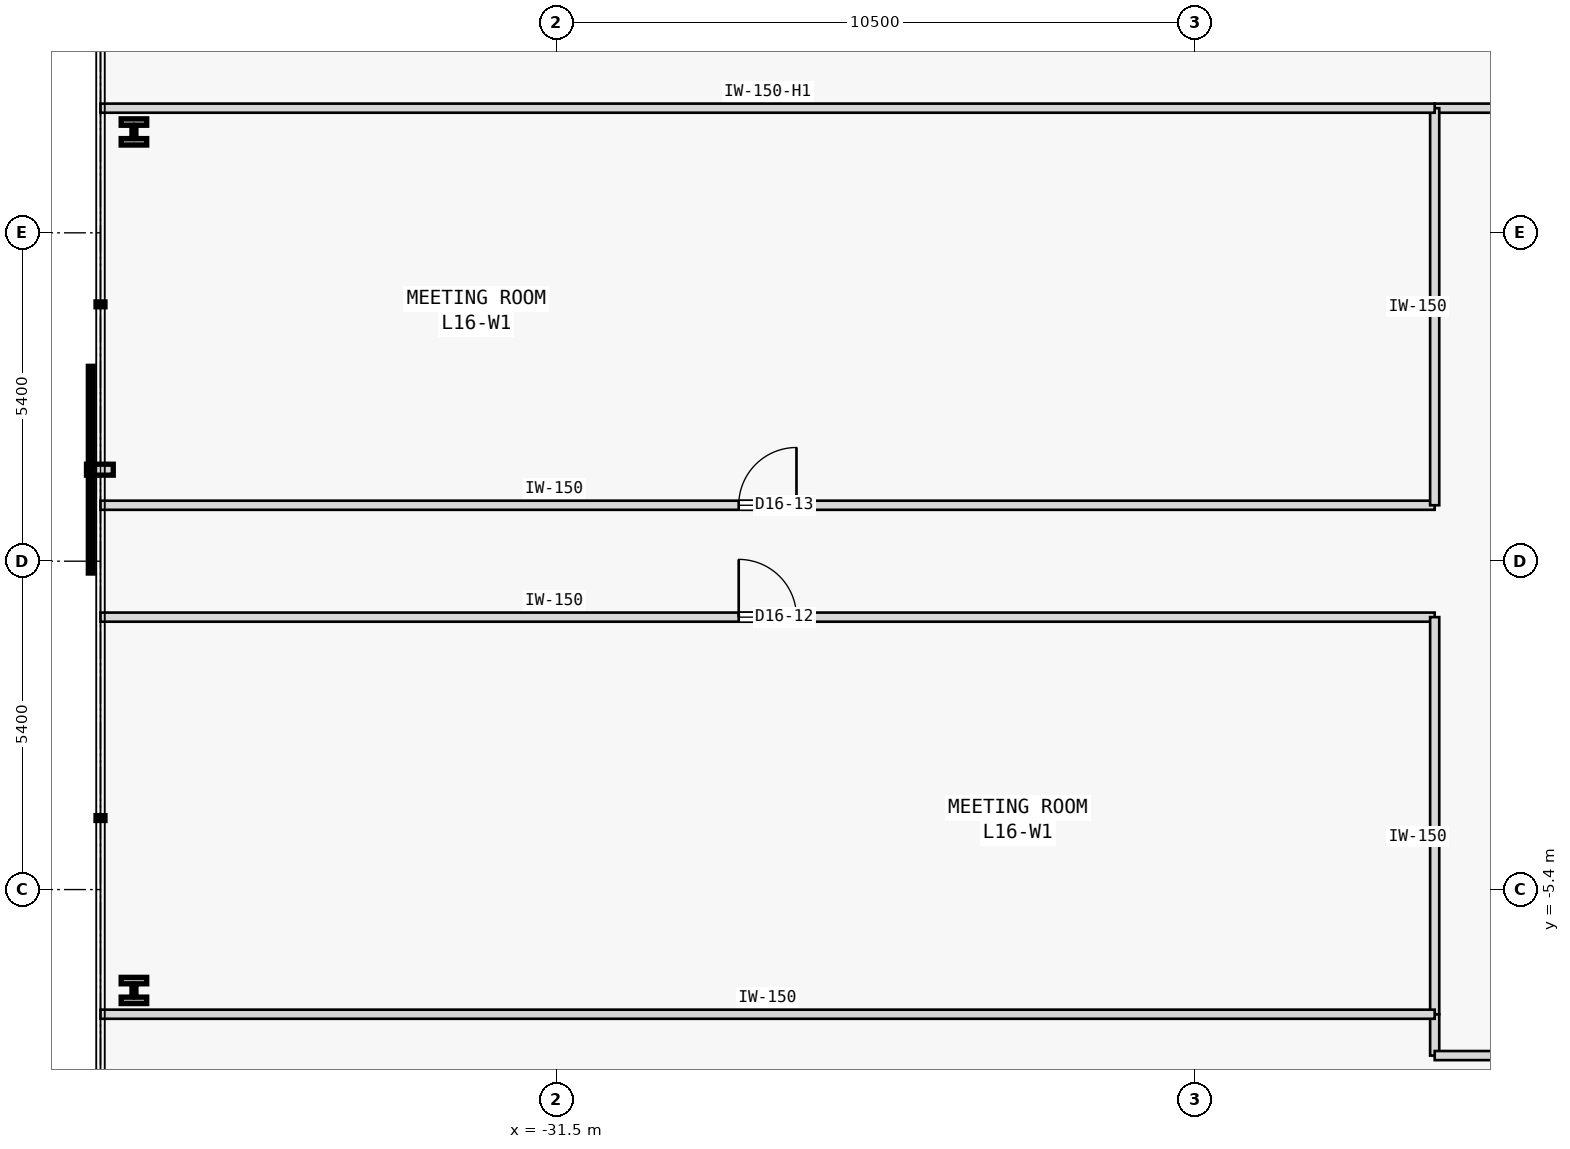
"""IFC4 building model, lengths in metres.
Left out: names, types, materials, properties, quantities, classifications, styles, units other than length and angle.
Written with IfcOpenShell. Run it as: python <this file> out.ifc"""

import sys

from ifc_helpers import new_model, si_unit, direction, frame, frame_2d, origin, origin_2d, place, context, subcontext, project, spatial, rectangle, i_section, extrude, element, fill, save


model = new_model("IFC4")
c1 = context("Model", 3, precision=1e-05, world=origin(), true_north=direction((0.0, 1.0)))
c2 = subcontext(c1, "Body", "Model", "MODEL_VIEW")
j1 = project(units=[si_unit("LENGTHUNIT", "METRE"), si_unit("PLANEANGLEUNIT", "RADIAN")], contexts=[c1])
p1 = place(None, origin())
s1 = spatial("IfcSite", under=j1, at=p1, CompositionType="ELEMENT")
p2 = place(p1, origin())
s2 = spatial("IfcBuilding", under=s1, at=p2, CompositionType="ELEMENT")
p3 = place(p2, frame((0.0, 0.0, 67.4)))
s3 = spatial("IfcBuildingStorey", under=s2, at=p3, CompositionType="ELEMENT", Elevation=67.4)
for number, where, z_axis, x_axis in (
    (1, (-38.45, 7.059, 0.0), (0.0, 0.0, 1.0), (1.0, 0.0, 0.0)),
    (2, (-38.45, -7.059, 0.0), (0.0, 0.0, 1.0), (1.0, 0.0, 0.0)),
):
    element("IfcColumn", number, at=place(p3, frame(where, z_axis=z_axis, x_axis=x_axis)), inside=s3, PredefinedType="COLUMN", context=c2, shape_type="SweptSolid", body=[
        extrude(i_section(OverallWidth=0.42, OverallDepth=0.431, WebThickness=0.065, FlangeThickness=0.106, FilletRadius=0.015, at=origin_2d()), origin(), (0.0, 0.0, 1.0), 3.8),
    ])
p4 = place(p3, frame((-17.059, 7.45, 0.0), z_axis=(0.0, 0.0, 1.0), x_axis=(1.0, 0.0, 0.0)))
e3 = element("IfcWall", 3, at=p4, inside=s3, PredefinedType="PARTITIONING", context=c2, shape_type="SweptSolid", body=[
    extrude(rectangle(XDim=16.139, YDim=0.15, at=frame_2d((8.07, 0.0))), origin(), (0.0, 0.0, 1.0), 3.575),
])
p5 = place(p3, frame((-17.059, -8.13, 0.0), z_axis=(0.0, 0.0, 1.0), x_axis=(0.0, 1.0, 0.0)))
e4 = element("IfcWall", 4, at=p5, inside=s3, PredefinedType="PARTITIONING", context=c2, shape_type="SweptSolid", body=[
    extrude(rectangle(XDim=0.68, YDim=0.15, at=frame_2d((0.34, 0.0))), origin(), (0.0, 0.0, 1.0), 3.575),
])
p6 = place(p3, frame((-17.059, -8.13, 0.0), z_axis=(0.0, 0.0, 1.0), x_axis=(1.0, 0.0, 0.0)))
e5 = element("IfcWall", 5, at=p6, inside=s3, PredefinedType="PARTITIONING", context=c2, shape_type="SweptSolid", body=[
    extrude(rectangle(XDim=13.939, YDim=0.15, at=frame_2d((6.969, 0.0))), origin(), (0.0, 0.0, 1.0), 3.575),
])
p7 = place(p6, frame((4.404, 0.0, 0.0)))
e6 = element("IfcOpeningElement", 6, at=p7, cuts=e5, PredefinedType="OPENING", context=c2, shape_type="SweptSolid", body=[
    extrude(rectangle(XDim=0.95, YDim=2.15, at=frame_2d((0.475, 1.075))), frame((0.0, 0.085, 0.0), z_axis=(0.0, -1.0, 0.0), x_axis=(1.0, 0.0, 0.0)), (0.0, 0.0, 1.0), 0.17),
])
p8 = place(p3, frame((-39.0, -0.92, 0.0), z_axis=(0.0, 0.0, 1.0), x_axis=(1.0, 0.0, 0.0)))
e7 = element("IfcWall", 7, at=p8, inside=s3, PredefinedType="PARTITIONING", context=c2, shape_type="SweptSolid", body=[
    extrude(rectangle(XDim=21.941, YDim=0.15, at=frame_2d((10.97, 0.0))), origin(), (0.0, 0.0, 1.0), 3.575),
])
p9 = place(p8, frame((10.496, 0.0, 0.0)))
e8 = element("IfcOpeningElement", 8, at=p9, cuts=e7, PredefinedType="OPENING", context=c2, shape_type="SweptSolid", body=[
    extrude(rectangle(XDim=0.95, YDim=2.15, at=frame_2d((0.475, 1.075))), frame((0.0, 0.085, 0.0), z_axis=(0.0, -1.0, 0.0), x_axis=(1.0, 0.0, 0.0)), (0.0, 0.0, 1.0), 0.17),
])
p10 = place(p3, frame((-17.059, -7.45, 0.0), z_axis=(0.0, 0.0, 1.0), x_axis=(0.0, 1.0, 0.0)))
e9 = element("IfcWall", 9, at=p10, inside=s3, PredefinedType="PARTITIONING", context=c2, shape_type="SweptSolid", body=[
    extrude(rectangle(XDim=6.53, YDim=0.15, at=frame_2d((3.265, 0.0))), origin(), (0.0, 0.0, 1.0), 3.575),
])
p11 = place(p3, frame((-39.0, 0.92, 0.0), z_axis=(0.0, 0.0, 1.0), x_axis=(1.0, 0.0, 0.0)))
e10 = element("IfcWall", 10, at=p11, inside=s3, PredefinedType="PARTITIONING", context=c2, shape_type="SweptSolid", body=[
    extrude(rectangle(XDim=21.941, YDim=0.15, at=frame_2d((10.97, 0.0))), origin(), (0.0, 0.0, 1.0), 3.575),
])
p12 = place(p11, frame((10.496, 0.0, 0.0)))
e11 = element("IfcOpeningElement", 11, at=p12, cuts=e10, PredefinedType="OPENING", context=c2, shape_type="SweptSolid", body=[
    extrude(rectangle(XDim=0.95, YDim=2.15, at=frame_2d((0.475, 1.075))), frame((0.0, 0.085, 0.0), z_axis=(0.0, -1.0, 0.0), x_axis=(1.0, 0.0, 0.0)), (0.0, 0.0, 1.0), 0.17),
])
p13 = place(p3, frame((-17.059, 0.92, 0.0), z_axis=(0.0, 0.0, 1.0), x_axis=(0.0, 1.0, 0.0)))
e12 = element("IfcWall", 12, at=p13, inside=s3, PredefinedType="PARTITIONING", context=c2, shape_type="SweptSolid", body=[
    extrude(rectangle(XDim=6.53, YDim=0.15, at=frame_2d((3.265, 0.0))), origin(), (0.0, 0.0, 1.0), 3.575),
])
p14 = place(p3, frame((-39.0, 7.45, 0.0), z_axis=(0.0, 0.0, 1.0), x_axis=(1.0, 0.0, 0.0)))
e13 = element("IfcWall", 13, at=p14, inside=s3, PredefinedType="PARTITIONING", context=c2, shape_type="SweptSolid", body=[
    extrude(rectangle(XDim=21.941, YDim=0.15, at=frame_2d((10.97, 0.0))), origin(), (0.0, 0.0, 1.0), 3.125),
])
p15 = place(p3, frame((-39.0, -7.45, 0.0), z_axis=(0.0, 0.0, 1.0), x_axis=(1.0, 0.0, 0.0)))
e14 = element("IfcWall", 14, at=p15, inside=s3, PredefinedType="PARTITIONING", context=c2, shape_type="SweptSolid", body=[
    extrude(rectangle(XDim=21.941, YDim=0.15, at=frame_2d((10.97, 0.0))), origin(), (0.0, 0.0, 1.0), 3.575),
])
p16 = place(p9, origin())
e15 = element("IfcDoor", 15, at=p16, inside=s3, OperationType="SINGLE_SWING_LEFT", PredefinedType="DOOR", context=c2, shape_type="SweptSolid", body=[
    extrude(rectangle(XDim=0.95, YDim=2.15, at=frame_2d((0.475, 1.075))), frame((0.0, 0.025, 0.0), z_axis=(0.0, -1.0, 0.0), x_axis=(1.0, 0.0, 0.0)), (0.0, 0.0, 1.0), 0.05),
])
fill(e8, e15)
p17 = place(p12, origin())
e16 = element("IfcDoor", 16, at=p17, inside=s3, OperationType="SINGLE_SWING_RIGHT", PredefinedType="DOOR", context=c2, shape_type="SweptSolid", body=[
    extrude(rectangle(XDim=0.95, YDim=2.15, at=frame_2d((0.475, 1.075))), frame((0.0, 0.025, 0.0), z_axis=(0.0, -1.0, 0.0), x_axis=(1.0, 0.0, 0.0)), (0.0, 0.0, 1.0), 0.05),
])
fill(e11, e16)
save(model, sys.argv[1])
